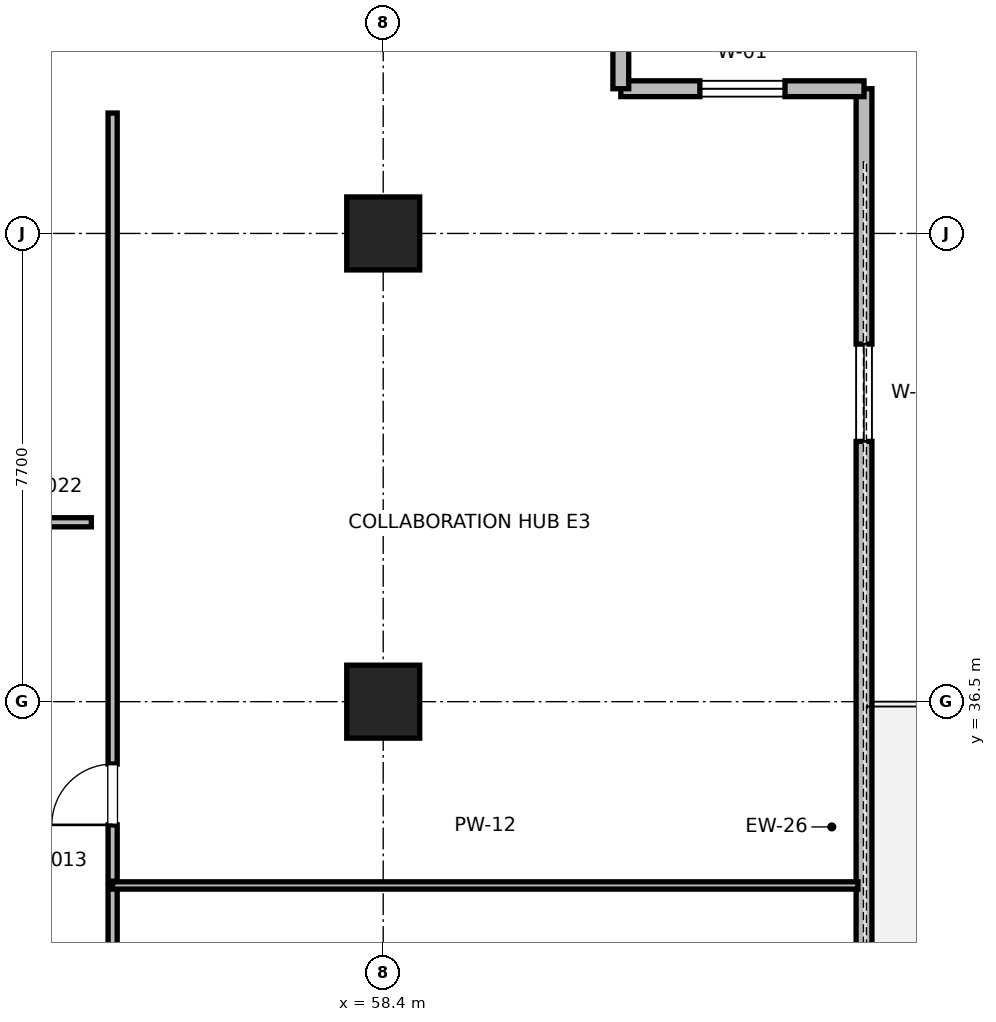
"""IFC4 building model, lengths in metres.
Left out: names, types, materials, properties, quantities, classifications, styles, units other than length and angle.
Written with IfcOpenShell. Run it as: python <this file> out.ifc"""

import sys

from ifc_helpers import new_model, si_unit, direction, frame, frame_2d, origin, origin_2d, place, context, subcontext, project, spatial, rectangle, extrude, element, fill, save


model = new_model("IFC4")
c1 = context("Model", 3, precision=1e-05, world=origin(), true_north=direction((0.0, 1.0)))
c2 = subcontext(c1, "Body", "Model", "MODEL_VIEW")
j1 = project(units=[si_unit("LENGTHUNIT", "METRE"), si_unit("PLANEANGLEUNIT", "RADIAN")], contexts=[c1])
p1 = place(None, origin())
s1 = spatial("IfcSite", under=j1, at=p1, CompositionType="ELEMENT")
p2 = place(p1, origin())
s2 = spatial("IfcBuilding", under=s1, at=p2, CompositionType="ELEMENT")
p3 = place(p2, frame((0.0, 0.0, 263.2)))
s3 = spatial("IfcBuildingStorey", under=s2, at=p3, CompositionType="ELEMENT", Elevation=263.2)
for number, where, z_axis, x_axis in (
    (1, (58.4, 36.5, 0.0), (0.0, 0.0, 1.0), (1.0, 0.0, 0.0)),
    (2, (58.4, 44.2, 0.0), (0.0, 0.0, 1.0), (1.0, 0.0, 0.0)),
):
    element("IfcColumn", number, at=place(p3, frame(where, z_axis=z_axis, x_axis=x_axis)), inside=s3, PredefinedType="COLUMN", context=c2, shape_type="SweptSolid", body=[
        extrude(rectangle(XDim=1.2, YDim=1.2, at=origin_2d()), origin(), (0.0, 0.0, 1.0), 4.0),
    ])
p4 = place(p3, frame((66.308, 8.42, 0.0), z_axis=(0.0, 0.0, 1.0), x_axis=(0.0, 1.0, 0.0)))
e3 = element("IfcWall", 3, at=p4, inside=s3, PredefinedType="PARAPET", context=c2, shape_type="SweptSolid", body=[
    extrude(rectangle(XDim=38.16, YDim=0.26, at=frame_2d((19.08, 0.0))), origin(), (0.0, 0.0, 1.0), 3.123),
])
p5 = place(p4, frame((4.2, 0.0, 0.85)))
e4 = element("IfcOpeningElement", 4, at=p5, cuts=e3, PredefinedType="OPENING", context=c2, shape_type="SweptSolid", body=[
    extrude(rectangle(XDim=1.6, YDim=2.1, at=frame_2d((0.8, 1.05))), frame((0.0, 0.13, 0.0), z_axis=(0.0, -1.0, 0.0), x_axis=(1.0, 0.0, 0.0)), (0.0, 0.0, 1.0), 0.26),
])
p6 = place(p4, frame((18.48, 0.0, 0.0)))
e5 = element("IfcOpeningElement", 5, at=p6, cuts=e3, PredefinedType="OPENING", context=c2, shape_type="SweptSolid", body=[
    extrude(rectangle(XDim=1.2, YDim=2.2, at=frame_2d((0.6, 1.1))), frame((0.0, 0.13, 0.0), z_axis=(0.0, -1.0, 0.0), x_axis=(1.0, 0.0, 0.0)), (0.0, 0.0, 1.0), 0.26),
])
p7 = place(p4, frame((32.36, 0.0, 0.85)))
e6 = element("IfcOpeningElement", 6, at=p7, cuts=e3, PredefinedType="OPENING", context=c2, shape_type="SweptSolid", body=[
    extrude(rectangle(XDim=1.6, YDim=2.1, at=frame_2d((0.8, 1.05))), frame((0.0, 0.13, 0.0), z_axis=(0.0, -1.0, 0.0), x_axis=(1.0, 0.0, 0.0)), (0.0, 0.0, 1.0), 0.26),
])
p8 = place(p3, frame((66.308, 46.58, 0.0), z_axis=(0.0, 0.0, 1.0), x_axis=(-1.0, 0.0, 0.0)))
e7 = element("IfcWall", 7, at=p8, inside=s3, PredefinedType="PARAPET", context=c2, shape_type="SweptSolid", body=[
    extrude(rectangle(XDim=4.0, YDim=0.26, at=frame_2d((2.0, 0.0))), origin(), (0.0, 0.0, 1.0), 3.785),
])
p9 = place(p8, frame((1.3, 0.0, 0.85)))
e8 = element("IfcOpeningElement", 8, at=p9, cuts=e7, PredefinedType="OPENING", context=c2, shape_type="SweptSolid", body=[
    extrude(rectangle(XDim=1.4, YDim=2.0, at=frame_2d((0.7, 1.0))), frame((0.0, 0.13, 0.0), z_axis=(0.0, -1.0, 0.0), x_axis=(1.0, 0.0, 0.0)), (0.0, 0.0, 1.0), 0.26),
])
p10 = place(p3, frame((62.308, 46.58, 0.0), z_axis=(0.0, 0.0, 1.0), x_axis=(0.0, 1.0, 0.0)))
e9 = element("IfcWall", 9, at=p10, inside=s3, PredefinedType="PARAPET", context=c2, shape_type="SweptSolid", body=[
    extrude(rectangle(XDim=3.5, YDim=0.26, at=frame_2d((1.75, 0.0))), origin(), (0.0, 0.0, 1.0), 3.785),
])
p11 = place(p3, frame((47.414, 39.45, 0.0), z_axis=(0.0, 0.0, 1.0), x_axis=(1.0, 0.0, 0.0)))
e10 = element("IfcWall", 10, at=p11, inside=s3, PredefinedType="PARTITIONING", context=c2, shape_type="SweptSolid", body=[
    extrude(rectangle(XDim=6.186, YDim=0.15, at=frame_2d((3.093, 0.0))), origin(), (0.0, 0.0, 1.0), 2.85),
])
p12 = place(p11, frame((2.543, 0.0, 0.0)))
e11 = element("IfcOpeningElement", 11, at=p12, cuts=e10, PredefinedType="OPENING", context=c2, shape_type="SweptSolid", body=[
    extrude(rectangle(XDim=1.0, YDim=2.15, at=frame_2d((0.5, 1.075))), frame((0.0, 0.075, 0.0), z_axis=(0.0, -1.0, 0.0), x_axis=(1.0, 0.0, 0.0)), (0.0, 0.0, 1.0), 0.15),
])
p13 = place(p3, frame((53.95, 20.845, 0.0), z_axis=(0.0, 0.0, 1.0), x_axis=(0.0, 1.0, 0.0)))
e12 = element("IfcWall", 12, at=p13, inside=s3, PredefinedType="PARTITIONING", context=c2, shape_type="SweptSolid", body=[
    extrude(rectangle(XDim=12.632, YDim=0.15, at=frame_2d((6.316, 0.0))), origin(), (0.0, 0.0, 1.0), 2.85),
])
p14 = place(p13, frame((5.781, 0.0, 0.0)))
e13 = element("IfcOpeningElement", 13, at=p14, cuts=e12, PredefinedType="OPENING", context=c2, shape_type="SweptSolid", body=[
    extrude(rectangle(XDim=1.0, YDim=2.15, at=frame_2d((0.5, 1.075))), frame((0.0, 0.075, 0.0), z_axis=(0.0, -1.0, 0.0), x_axis=(1.0, 0.0, 0.0)), (0.0, 0.0, 1.0), 0.15),
])
p15 = place(p3, frame((53.95, 33.478, 0.0), z_axis=(0.0, 0.0, 1.0), x_axis=(1.0, 0.0, 0.0)))
e14 = element("IfcWall", 14, at=p15, inside=s3, PredefinedType="PARTITIONING", context=c2, shape_type="SweptSolid", body=[
    extrude(rectangle(XDim=12.258, YDim=0.12, at=frame_2d((6.129, 0.0))), origin(), (0.0, 0.0, 1.0), 2.85),
])
p16 = place(p3, frame((53.95, 33.548, 0.0), z_axis=(0.0, 0.0, 1.0), x_axis=(0.0, 1.0, 0.0)))
e15 = element("IfcWall", 15, at=p16, inside=s3, PredefinedType="PARTITIONING", context=c2, shape_type="SweptSolid", body=[
    extrude(rectangle(XDim=12.632, YDim=0.15, at=frame_2d((6.316, 0.0))), origin(), (0.0, 0.0, 1.0), 2.85),
])
p17 = place(p16, frame((0.926, 0.0, 0.0)))
e16 = element("IfcOpeningElement", 16, at=p17, cuts=e15, PredefinedType="OPENING", context=c2, shape_type="SweptSolid", body=[
    extrude(rectangle(XDim=1.0, YDim=2.15, at=frame_2d((0.5, 1.075))), frame((0.0, 0.075, 0.0), z_axis=(0.0, -1.0, 0.0), x_axis=(1.0, 0.0, 0.0)), (0.0, 0.0, 1.0), 0.15),
])
p18 = place(p7, origin())
e17 = element("IfcWindow", 17, at=p18, inside=s3, PartitioningType="SINGLE_PANEL", PredefinedType="WINDOW", context=c2, shape_type="SweptSolid", body=[
    extrude(rectangle(XDim=1.6, YDim=2.1, at=frame_2d((0.8, 1.05))), frame((0.0, 0.03, 0.0), z_axis=(0.0, -1.0, 0.0), x_axis=(1.0, 0.0, 0.0)), (0.0, 0.0, 1.0), 0.06),
])
fill(e6, e17)
p19 = place(p9, origin())
e18 = element("IfcWindow", 18, at=p19, inside=s3, PartitioningType="SINGLE_PANEL", PredefinedType="WINDOW", context=c2, shape_type="SweptSolid", body=[
    extrude(rectangle(XDim=1.4, YDim=2.0, at=frame_2d((0.7, 1.0))), frame((0.0, 0.03, 0.0), z_axis=(0.0, -1.0, 0.0), x_axis=(1.0, 0.0, 0.0)), (0.0, 0.0, 1.0), 0.06),
])
fill(e8, e18)
p20 = place(p17, origin())
e19 = element("IfcDoor", 19, at=p20, inside=s3, OperationType="SINGLE_SWING_LEFT", PredefinedType="DOOR", context=c2, shape_type="SweptSolid", body=[
    extrude(rectangle(XDim=1.0, YDim=2.15, at=frame_2d((0.5, 1.075))), frame((0.0, 0.025, 0.0), z_axis=(0.0, -1.0, 0.0), x_axis=(1.0, 0.0, 0.0)), (0.0, 0.0, 1.0), 0.05),
])
fill(e16, e19)
save(model, sys.argv[1])
